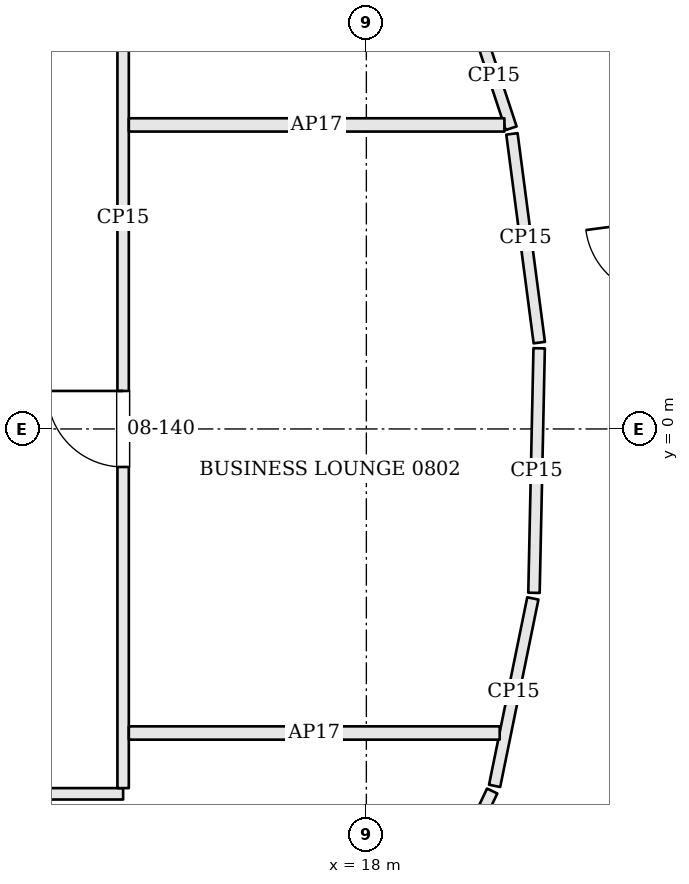
"""IFC4 building model, lengths in metres.
Left out: names, types, materials, properties, quantities, classifications, styles, units other than length and angle.
Written with IfcOpenShell. Run it as: python <this file> out.ifc"""

import sys

from ifc_helpers import new_model, si_unit, direction, frame, frame_2d, origin, place, context, subcontext, project, spatial, rectangle, extrude, element, fill, save


model = new_model("IFC4")
c1 = context("Model", 3, precision=1e-05, world=origin(), true_north=direction((0.0, 1.0)))
c2 = subcontext(c1, "Body", "Model", "MODEL_VIEW")
j1 = project(units=[si_unit("LENGTHUNIT", "METRE"), si_unit("PLANEANGLEUNIT", "RADIAN")], contexts=[c1])
p1 = place(None, origin())
s1 = spatial("IfcSite", under=j1, at=p1, CompositionType="ELEMENT")
p2 = place(p1, origin())
s2 = spatial("IfcBuilding", under=s1, at=p2, CompositionType="ELEMENT")
p3 = place(p2, frame((0.0, 0.0, 44.7)))
s3 = spatial("IfcBuildingStorey", under=s2, at=p3, CompositionType="ELEMENT", Elevation=44.7)
p4 = place(p3, frame((21.645, 4.43, 0.0), z_axis=(0.0, 0.0, 1.0), x_axis=(-0.313700743044, 0.949521902756, 0.0)))
e1 = element("IfcWall", 1, at=p4, inside=s3, PredefinedType="PARTITIONING", context=c2, shape_type="SweptSolid", body=[
    extrude(rectangle(XDim=1.798, YDim=0.15, at=frame_2d((0.899, 0.0))), origin(), (0.0, 0.0, 1.0), 2.68),
])
p5 = place(p3, frame((19.454, 5.324, 0.0), z_axis=(0.0, 0.0, 1.0), x_axis=(0.313632756375, -0.949544361327, 0.0)))
e2 = element("IfcWall", 2, at=p5, inside=s3, PredefinedType="PARTITIONING", context=c2, shape_type="SweptSolid", body=[
    extrude(rectangle(XDim=1.44, YDim=0.15, at=frame_2d((0.72, 0.0))), origin(), (0.0, 0.0, 1.0), 2.68),
])
p6 = place(p3, frame((19.915, 3.882, 0.0), z_axis=(0.0, 0.0, 1.0), x_axis=(0.129945947446, -0.991521079323, 0.0)))
e3 = element("IfcWall", 3, at=p6, inside=s3, PredefinedType="PARTITIONING", context=c2, shape_type="SweptSolid", body=[
    extrude(rectangle(XDim=2.769, YDim=0.15, at=frame_2d((1.385, 0.0))), origin(), (0.0, 0.0, 1.0), 2.68),
])
p7 = place(p3, frame((20.273, 1.061, 0.0), z_axis=(0.0, 0.0, 1.0), x_axis=(-0.021166906337, -0.99977595594, 0.0)))
e4 = element("IfcWall", 4, at=p7, inside=s3, PredefinedType="PARTITIONING", context=c2, shape_type="SweptSolid", body=[
    extrude(rectangle(XDim=3.218, YDim=0.15, at=frame_2d((1.609, 0.0))), origin(), (0.0, 0.0, 1.0), 2.68),
])
p8 = place(p3, frame((20.19, -2.229, 0.0), z_axis=(0.0, 0.0, 1.0), x_axis=(-0.199752828647, -0.97984631828, 0.0)))
e5 = element("IfcWall", 5, at=p8, inside=s3, PredefinedType="PARTITIONING", context=c2, shape_type="SweptSolid", body=[
    extrude(rectangle(XDim=2.517, YDim=0.15, at=frame_2d((1.258, 0.0))), origin(), (0.0, 0.0, 1.0), 2.68),
])
p9 = place(p3, frame((19.655, -4.763, 0.0), z_axis=(0.0, 0.0, 1.0), x_axis=(-0.427965880464, -0.903794891089, 0.0)))
e6 = element("IfcWall", 6, at=p9, inside=s3, PredefinedType="PARTITIONING", context=c2, shape_type="SweptSolid", body=[
    extrude(rectangle(XDim=2.178, YDim=0.15, at=frame_2d((1.089, 0.0))), origin(), (0.0, 0.0, 1.0), 2.68),
])
p10 = place(p3, frame((-14.725, -4.8, 0.0), z_axis=(0.0, 0.0, 1.0), x_axis=(1.0, 0.0, 0.0)))
e7 = element("IfcWall", 7, at=p10, inside=s3, PredefinedType="PARTITIONING", context=c2, shape_type="SweptSolid", body=[
    extrude(rectangle(XDim=29.525, YDim=0.15, at=frame_2d((14.763, 0.0))), origin(), (0.0, 0.0, 1.0), 2.68),
])
p11 = place(p10, frame((2.075, 0.0, 0.0)))
e8 = element("IfcOpeningElement", 8, at=p11, cuts=e7, PredefinedType="OPENING", context=c2, shape_type="SweptSolid", body=[
    extrude(rectangle(XDim=1.0, YDim=2.4, at=frame_2d((0.5, 1.2))), frame((0.0, 0.085, 0.0), z_axis=(0.0, -1.0, 0.0), x_axis=(1.0, 0.0, 0.0)), (0.0, 0.0, 1.0), 0.17),
])
p12 = place(p10, frame((13.825, 0.0, 0.0)))
e9 = element("IfcOpeningElement", 9, at=p12, cuts=e7, PredefinedType="OPENING", context=c2, shape_type="SweptSolid", body=[
    extrude(rectangle(XDim=1.8, YDim=2.1, at=frame_2d((0.9, 1.05))), frame((0.0, 0.085, 0.0), z_axis=(0.0, -1.0, 0.0), x_axis=(1.0, 0.0, 0.0)), (0.0, 0.0, 1.0), 0.17),
])
p13 = place(p10, frame((26.375, 0.0, 0.0)))
e10 = element("IfcOpeningElement", 10, at=p13, cuts=e7, PredefinedType="OPENING", context=c2, shape_type="SweptSolid", body=[
    extrude(rectangle(XDim=1.0, YDim=2.4, at=frame_2d((0.5, 1.2))), frame((0.0, 0.085, 0.0), z_axis=(0.0, -1.0, 0.0), x_axis=(1.0, 0.0, 0.0)), (0.0, 0.0, 1.0), 0.17),
])
p14 = place(p3, frame((14.8, -4.725, 0.0), z_axis=(0.0, 0.0, 1.0), x_axis=(0.0, 1.0, 0.0)))
e11 = element("IfcWall", 11, at=p14, inside=s3, PredefinedType="PARTITIONING", context=c2, shape_type="SweptSolid", body=[
    extrude(rectangle(XDim=15.008, YDim=0.15, at=frame_2d((7.504, 0.0))), origin(), (0.0, 0.0, 1.0), 2.68),
])
p15 = place(p14, frame((11.516, 0.0, 0.0)))
e12 = element("IfcOpeningElement", 12, at=p15, cuts=e11, PredefinedType="OPENING", context=c2, shape_type="SweptSolid", body=[
    extrude(rectangle(XDim=0.7, YDim=2.1, at=frame_2d((0.35, 1.05))), frame((0.0, 0.085, 0.0), z_axis=(0.0, -1.0, 0.0), x_axis=(1.0, 0.0, 0.0)), (0.0, 0.0, 1.0), 0.17),
])
p16 = place(p14, frame((4.225, 0.0, 0.0)))
e13 = element("IfcOpeningElement", 13, at=p16, cuts=e11, PredefinedType="OPENING", context=c2, shape_type="SweptSolid", body=[
    extrude(rectangle(XDim=1.0, YDim=2.1, at=frame_2d((0.5, 1.05))), frame((0.0, 0.085, 0.0), z_axis=(0.0, -1.0, 0.0), x_axis=(1.0, 0.0, 0.0)), (0.0, 0.0, 1.0), 0.17),
])
p17 = place(p3, frame((14.875, 4.0, 0.0), z_axis=(0.0, 0.0, 1.0), x_axis=(1.0, 0.0, 0.0)))
e14 = element("IfcWall", 14, at=p17, inside=s3, PredefinedType="PARTITIONING", context=c2, shape_type="SweptSolid", body=[
    extrude(rectangle(XDim=4.941, YDim=0.175, at=frame_2d((2.471, 0.0))), origin(), (0.0, 0.0, 1.0), 2.68),
])
p18 = place(p3, frame((14.875, -4.0, 0.0), z_axis=(0.0, 0.0, 1.0), x_axis=(1.0, 0.0, 0.0)))
e15 = element("IfcWall", 15, at=p18, inside=s3, PredefinedType="PARTITIONING", context=c2, shape_type="SweptSolid", body=[
    extrude(rectangle(XDim=4.879, YDim=0.175, at=frame_2d((2.439, 0.0))), origin(), (0.0, 0.0, 1.0), 2.68),
])
p19 = place(p16, origin())
e16 = element("IfcDoor", 16, at=p19, inside=s3, OperationType="SINGLE_SWING_RIGHT", PredefinedType="DOOR", context=c2, shape_type="SweptSolid", body=[
    extrude(rectangle(XDim=1.0, YDim=2.1, at=frame_2d((0.5, 1.05))), frame((0.0, 0.025, 0.0), z_axis=(0.0, -1.0, 0.0), x_axis=(1.0, 0.0, 0.0)), (0.0, 0.0, 1.0), 0.05),
])
fill(e13, e16)
save(model, sys.argv[1])
